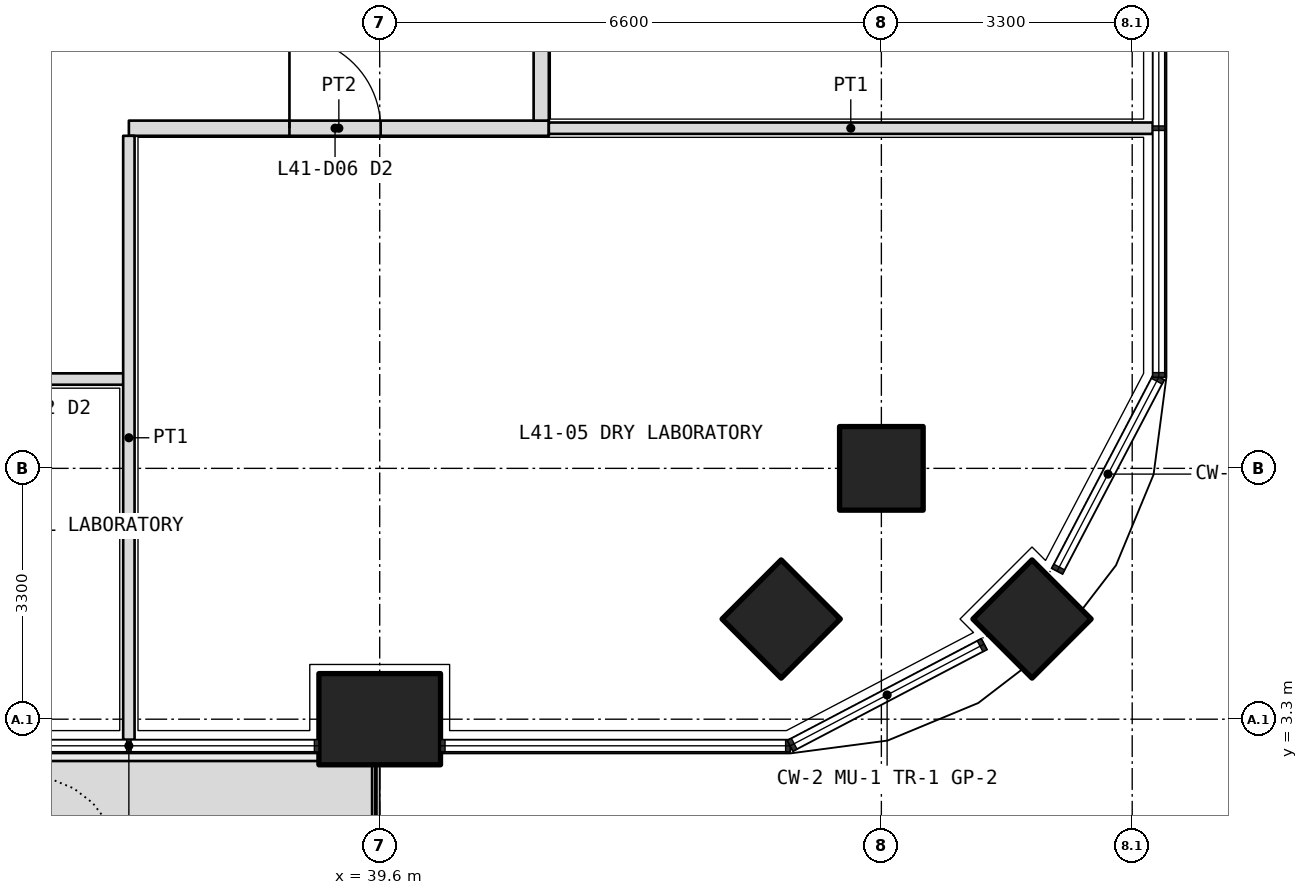
"""IFC4 building model, lengths in metres.
Left out: names, types, materials, properties, quantities, classifications, styles, units other than length and angle.
Written with IfcOpenShell. Run it as: python <this file> out.ifc"""

import sys

from ifc_helpers import new_model, si_unit, direction, frame, frame_2d, origin, origin_2d, place, context, subcontext, project, spatial, polyline, rectangle, outline, extrude, element, fill, save


model = new_model("IFC4")
c1 = context("Model", 3, precision=1e-05, world=origin(), true_north=direction((0.0, 1.0)))
c2 = subcontext(c1, "Body", "Model", "MODEL_VIEW")
j1 = project(units=[si_unit("LENGTHUNIT", "METRE"), si_unit("PLANEANGLEUNIT", "RADIAN")], contexts=[c1])
p1 = place(None, origin())
s1 = spatial("IfcSite", under=j1, at=p1, CompositionType="ELEMENT")
p2 = place(p1, origin())
s2 = spatial("IfcBuilding", under=s1, at=p2, CompositionType="ELEMENT")
p3 = place(p2, frame((0.0, 0.0, 180.9)))
s3 = spatial("IfcBuildingStorey", under=s2, at=p3, CompositionType="ELEMENT", Elevation=180.9)
p4 = place(p3, frame((48.182, 4.618, 0.0), z_axis=(0.0, 0.0, 1.0), x_axis=(0.707106781187, 0.707106781187, 0.0)))
e1 = element("IfcColumn", 1, at=p4, inside=s3, PredefinedType="COLUMN", context=c2, shape_type="SweptSolid", body=[
    extrude(rectangle(XDim=1.1, YDim=1.1, at=origin_2d()), origin(), (0.0, 0.0, 1.0), 4.2),
])
p5 = place(p3, frame((39.6, 3.3, 0.0), z_axis=(0.0, 0.0, 1.0), x_axis=(1.0, 0.0, 0.0)))
e2 = element("IfcColumn", 2, at=p5, inside=s3, PredefinedType="COLUMN", context=c2, shape_type="SweptSolid", body=[
    extrude(rectangle(XDim=1.6, YDim=1.2, at=origin_2d()), origin(), (0.0, 0.0, 1.0), 4.2),
])
for number, where, z_axis, x_axis in (
    (3, (46.2, 6.6, 0.0), (0.0, 0.0, 1.0), (1.0, 0.0, 0.0)),
    (4, (44.882, 4.618, 0.0), (0.0, 0.0, 1.0), (0.707, 0.707, 0.0)),
):
    element("IfcColumn", number, at=place(p3, frame(where, z_axis=z_axis, x_axis=x_axis)), inside=s3, PredefinedType="COLUMN", context=c2, shape_type="SweptSolid", body=[
        extrude(rectangle(XDim=1.1, YDim=1.1, at=origin_2d()), origin(), (0.0, 0.0, 1.0), 4.2),
    ])
p6 = place(p3, origin())
e5 = element("IfcWall", 5, at=p6, inside=s3, PredefinedType="USERDEFINED", context=c2, shape_type="SweptSolid", body=[
    extrude(outline(polyline([(30.45, 1.75), (39.5, 1.75), (39.5, 2.75), (30.45, 2.75), (30.45, 1.75)]), holes=[polyline([(30.6, 1.9), (39.35, 1.9), (39.35, 2.6), (30.6, 2.6), (30.6, 1.9)])]), origin(), (0.0, 0.0, 1.0), 1.05),
])
p7 = place(p3, frame((36.3, 11.075, 0.0), z_axis=(0.0, 0.0, 1.0), x_axis=(1.0, 0.0, 0.0)))
e6 = element("IfcWall", 6, at=p7, inside=s3, PredefinedType="PARTITIONING", context=c2, shape_type="SweptSolid", body=[
    extrude(rectangle(XDim=5.525, YDim=0.2, at=frame_2d((2.762, 0.0))), origin(), (0.0, 0.0, 1.0), 2.85),
])
p8 = place(p7, frame((2.113, 0.0, 0.0)))
e7 = element("IfcOpeningElement", 7, at=p8, cuts=e6, PredefinedType="OPENING", context=c2, shape_type="SweptSolid", body=[
    extrude(rectangle(XDim=1.2, YDim=2.1, at=frame_2d((0.6, 1.05))), frame((0.0, 0.11, 0.0), z_axis=(0.0, -1.0, 0.0), x_axis=(1.0, 0.0, 0.0)), (0.0, 0.0, 1.0), 0.22),
])
p9 = place(p3, frame((41.725, 11.175, 0.0), z_axis=(0.0, 0.0, 1.0), x_axis=(0.0, 1.0, 0.0)))
e8 = element("IfcWall", 8, at=p9, inside=s3, PredefinedType="PARTITIONING", context=c2, shape_type="SweptSolid", body=[
    extrude(rectangle(XDim=23.85, YDim=0.2, at=frame_2d((11.925, 0.0))), origin(), (0.0, 0.0, 1.0), 2.85),
])
p10 = place(p9, frame((2.113, 0.0, 0.0)))
e9 = element("IfcOpeningElement", 9, at=p10, cuts=e8, PredefinedType="OPENING", context=c2, shape_type="SweptSolid", body=[
    extrude(rectangle(XDim=1.0, YDim=2.1, at=frame_2d((0.5, 1.05))), frame((0.0, 0.11, 0.0), z_axis=(0.0, -1.0, 0.0), x_axis=(1.0, 0.0, 0.0)), (0.0, 0.0, 1.0), 0.22),
])
p11 = place(p9, frame((6.475, 0.0, 0.0)))
e10 = element("IfcOpeningElement", 10, at=p11, cuts=e8, PredefinedType="OPENING", context=c2, shape_type="SweptSolid", body=[
    extrude(rectangle(XDim=1.0, YDim=2.1, at=frame_2d((0.5, 1.05))), frame((0.0, 0.11, 0.0), z_axis=(0.0, -1.0, 0.0), x_axis=(1.0, 0.0, 0.0)), (0.0, 0.0, 1.0), 0.22),
])
p12 = place(p9, frame((9.625, 0.0, 0.0)))
e11 = element("IfcOpeningElement", 11, at=p12, cuts=e8, PredefinedType="OPENING", context=c2, shape_type="SweptSolid", body=[
    extrude(rectangle(XDim=1.0, YDim=2.1, at=frame_2d((0.5, 1.05))), frame((0.0, 0.11, 0.0), z_axis=(0.0, -1.0, 0.0), x_axis=(1.0, 0.0, 0.0)), (0.0, 0.0, 1.0), 0.22),
])
p13 = place(p9, frame((12.975, 0.0, 0.0)))
e12 = element("IfcOpeningElement", 12, at=p13, cuts=e8, PredefinedType="OPENING", context=c2, shape_type="SweptSolid", body=[
    extrude(rectangle(XDim=0.9, YDim=2.1, at=frame_2d((0.45, 1.05))), frame((0.0, 0.11, 0.0), z_axis=(0.0, -1.0, 0.0), x_axis=(1.0, 0.0, 0.0)), (0.0, 0.0, 1.0), 0.22),
])
p14 = place(p9, frame((16.375, 0.0, 0.0)))
e13 = element("IfcOpeningElement", 13, at=p14, cuts=e8, PredefinedType="OPENING", context=c2, shape_type="SweptSolid", body=[
    extrude(rectangle(XDim=1.0, YDim=2.1, at=frame_2d((0.5, 1.05))), frame((0.0, 0.11, 0.0), z_axis=(0.0, -1.0, 0.0), x_axis=(1.0, 0.0, 0.0)), (0.0, 0.0, 1.0), 0.22),
])
p15 = place(p9, frame((19.575, 0.0, 0.0)))
e14 = element("IfcOpeningElement", 14, at=p15, cuts=e8, PredefinedType="OPENING", context=c2, shape_type="SweptSolid", body=[
    extrude(rectangle(XDim=1.2, YDim=2.1, at=frame_2d((0.6, 1.05))), frame((0.0, 0.11, 0.0), z_axis=(0.0, -1.0, 0.0), x_axis=(1.0, 0.0, 0.0)), (0.0, 0.0, 1.0), 0.22),
])
p16 = place(p9, frame((22.288, 0.0, 0.0)))
e15 = element("IfcOpeningElement", 15, at=p16, cuts=e8, PredefinedType="OPENING", context=c2, shape_type="SweptSolid", body=[
    extrude(rectangle(XDim=1.2, YDim=2.1, at=frame_2d((0.6, 1.05))), frame((0.0, 0.11, 0.0), z_axis=(0.0, -1.0, 0.0), x_axis=(1.0, 0.0, 0.0)), (0.0, 0.0, 1.0), 0.22),
])
p17 = place(p3, frame((49.77, 11.075, 0.0), z_axis=(0.0, 0.0, 1.0), x_axis=(-1.0, 0.0, 0.0)))
e16 = element("IfcWall", 16, at=p17, inside=s3, PredefinedType="PARTITIONING", context=c2, shape_type="SweptSolid", body=[
    extrude(rectangle(XDim=7.945, YDim=0.15, at=frame_2d((3.973, 0.0))), origin(), (0.0, 0.0, 1.0), 2.7),
])
p18 = place(p3, frame((33.0, 7.775, 0.0), z_axis=(0.0, 0.0, 1.0), x_axis=(1.0, 0.0, 0.0)))
e17 = element("IfcWall", 17, at=p18, inside=s3, PredefinedType="PARTITIONING", context=c2, shape_type="SweptSolid", body=[
    extrude(rectangle(XDim=3.3, YDim=0.15, at=frame_2d((1.65, 0.0))), origin(), (0.0, 0.0, 1.0), 2.85),
])
p19 = place(p18, frame((1.05, 0.0, 0.0)))
e18 = element("IfcOpeningElement", 18, at=p19, cuts=e17, PredefinedType="OPENING", context=c2, shape_type="SweptSolid", body=[
    extrude(rectangle(XDim=1.2, YDim=2.1, at=frame_2d((0.6, 1.05))), frame((0.0, 0.085, 0.0), z_axis=(0.0, -1.0, 0.0), x_axis=(1.0, 0.0, 0.0)), (0.0, 0.0, 1.0), 0.17),
])
p20 = place(p3, frame((36.3, 3.03, 0.0), z_axis=(0.0, 0.0, 1.0), x_axis=(0.0, 1.0, 0.0)))
e19 = element("IfcWall", 19, at=p20, inside=s3, PredefinedType="PARTITIONING", context=c2, shape_type="SweptSolid", body=[
    extrude(rectangle(XDim=7.945, YDim=0.15, at=frame_2d((3.973, 0.0))), origin(), (0.0, 0.0, 1.0), 2.7),
])
p21 = place(p8, origin())
e20 = element("IfcDoor", 20, at=p21, inside=s3, OperationType="DOUBLE_DOOR_SINGLE_SWING", PredefinedType="DOOR", context=c2, shape_type="SweptSolid", body=[
    extrude(rectangle(XDim=1.2, YDim=2.1, at=frame_2d((0.6, 1.05))), frame((0.0, 0.025, 0.0), z_axis=(0.0, -1.0, 0.0), x_axis=(1.0, 0.0, 0.0)), (0.0, 0.0, 1.0), 0.05),
])
fill(e7, e20)
save(model, sys.argv[1])
